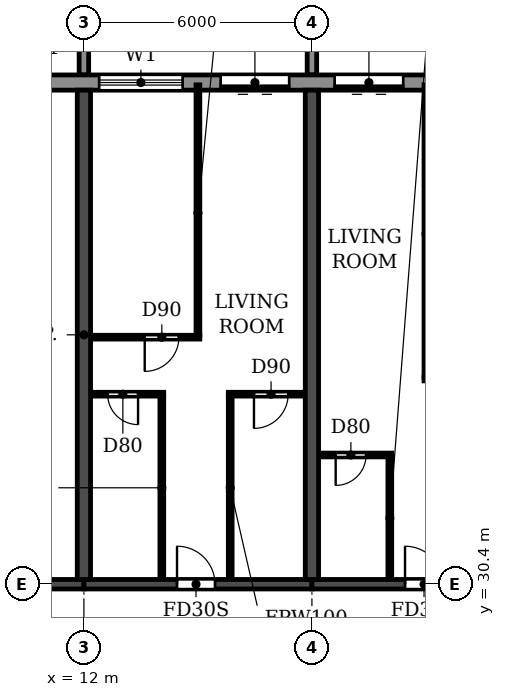
"""IFC4 building model, lengths in metres.
Left out: names, types, materials, properties, quantities, classifications, styles, units other than length and angle.
Written with IfcOpenShell. Run it as: python <this file> out.ifc"""

import sys

from ifc_helpers import new_model, si_unit, direction, frame, frame_2d, origin, place, context, subcontext, project, spatial, polyline, rectangle, outline, extrude, source, transform, mapped, element, fill, save


model = new_model("IFC4")
c1 = context("Model", 3, precision=1e-05, world=origin(), true_north=direction((0.0, 1.0)))
c2 = subcontext(c1, "Body", "Model", "MODEL_VIEW")
j1 = project(units=[si_unit("LENGTHUNIT", "METRE"), si_unit("PLANEANGLEUNIT", "RADIAN")], contexts=[c1])
p1 = place(None, origin())
s1 = spatial("IfcSite", under=j1, at=p1, CompositionType="ELEMENT")
p2 = place(p1, origin())
s2 = spatial("IfcBuilding", under=s1, at=p2, CompositionType="ELEMENT")
p3 = place(p2, frame((0.0, 0.0, 72.9)))
s3 = spatial("IfcBuildingStorey", under=s2, at=p3, CompositionType="ELEMENT", Elevation=72.9)
for number, where, z_axis, x_axis in (
    (1, (12.0, 30.525, 0.0), (0.0, 0.0, 1.0), (0.0, 1.0, 0.0)),
    (2, (18.0, 30.525, 0.0), (0.0, 0.0, 1.0), (0.0, 1.0, 0.0)),
):
    element("IfcWall", number, at=place(p3, frame(where, z_axis=z_axis, x_axis=x_axis)), inside=s3, PredefinedType="SHEAR", context=c2, shape_type="SweptSolid", body=[
        extrude(rectangle(XDim=12.875, YDim=0.35, at=frame_2d((6.438, 0.0))), origin(), (0.0, 0.0, 1.0), 3.06),
    ])
p4 = place(p3, frame((6.2, 30.4, 0.0), z_axis=(0.0, 0.0, 1.0), x_axis=(1.0, 0.0, 0.0)))
e3 = element("IfcWall", 3, at=p4, inside=s3, PredefinedType="SHEAR", context=c2, shape_type="SweptSolid", body=[
    extrude(rectangle(XDim=5.8, YDim=0.25, at=frame_2d((2.9, 0.0))), origin(), (0.0, 0.0, 1.0), 2.46),
])
p5 = place(p4, frame((2.3, 0.0, 0.0)))
e4 = element("IfcOpeningElement", 4, at=p5, cuts=e3, PredefinedType="OPENING", context=c2, shape_type="SweptSolid", body=[
    extrude(rectangle(XDim=1.0, YDim=2.1, at=frame_2d((0.5, 1.05))), frame((0.0, 0.135, 0.0), z_axis=(0.0, -1.0, 0.0), x_axis=(1.0, 0.0, 0.0)), (0.0, 0.0, 1.0), 0.27),
])
p6 = place(p3, frame((12.0, 30.4, 0.0), z_axis=(0.0, 0.0, 1.0), x_axis=(1.0, 0.0, 0.0)))
e5 = element("IfcWall", 5, at=p6, inside=s3, PredefinedType="SHEAR", context=c2, shape_type="SweptSolid", body=[
    extrude(rectangle(XDim=6.0, YDim=0.25, at=frame_2d((3.0, 0.0))), origin(), (0.0, 0.0, 1.0), 2.46),
])
p7 = place(p6, frame((2.45, 0.0, 0.0)))
e6 = element("IfcOpeningElement", 6, at=p7, cuts=e5, PredefinedType="OPENING", context=c2, shape_type="SweptSolid", body=[
    extrude(rectangle(XDim=1.0, YDim=2.1, at=frame_2d((0.5, 1.05))), frame((0.0, 0.135, 0.0), z_axis=(0.0, -1.0, 0.0), x_axis=(1.0, 0.0, 0.0)), (0.0, 0.0, 1.0), 0.27),
])
p8 = place(p3, frame((18.0, 30.4, 0.0), z_axis=(0.0, 0.0, 1.0), x_axis=(1.0, 0.0, 0.0)))
e7 = element("IfcWall", 7, at=p8, inside=s3, PredefinedType="SHEAR", context=c2, shape_type="SweptSolid", body=[
    extrude(rectangle(XDim=6.0, YDim=0.25, at=frame_2d((3.0, 0.0))), origin(), (0.0, 0.0, 1.0), 2.46),
])
p9 = place(p8, frame((2.45, 0.0, 0.0)))
e8 = element("IfcOpeningElement", 8, at=p9, cuts=e7, PredefinedType="OPENING", context=c2, shape_type="SweptSolid", body=[
    extrude(rectangle(XDim=1.0, YDim=2.1, at=frame_2d((0.5, 1.05))), frame((0.0, 0.135, 0.0), z_axis=(0.0, -1.0, 0.0), x_axis=(1.0, 0.0, 0.0)), (0.0, 0.0, 1.0), 0.27),
])
p10 = place(p3, frame((91.317, 43.6, 0.0), z_axis=(0.0, 0.0, 1.0), x_axis=(-1.0, 0.0, 0.0)))
e9 = element("IfcWall", 9, at=p10, inside=s3, PredefinedType="STANDARD", context=c2, shape_type="SweptSolid", body=[
    extrude(rectangle(XDim=80.634, YDim=0.4, at=frame_2d((40.317, 0.0))), origin(), (0.0, 0.0, 1.0), 3.06),
])
p11 = place(p10, frame((76.717, 0.0, 0.9)))
e10 = element("IfcOpeningElement", 10, at=p11, cuts=e9, PredefinedType="OPENING", context=c2, shape_type="SweptSolid", body=[
    extrude(rectangle(XDim=2.2, YDim=1.5, at=frame_2d((1.1, 0.75))), frame((0.0, 0.21, 0.0), z_axis=(0.0, -1.0, 0.0), x_axis=(1.0, 0.0, 0.0)), (0.0, 0.0, 1.0), 0.42),
])
p12 = place(p10, frame((73.917, 0.0, 0.0)))
e11 = element("IfcOpeningElement", 11, at=p12, cuts=e9, PredefinedType="OPENING", context=c2, shape_type="SweptSolid", body=[
    extrude(rectangle(XDim=1.8, YDim=2.4, at=frame_2d((0.9, 1.2))), frame((0.0, 0.21, 0.0), z_axis=(0.0, -1.0, 0.0), x_axis=(1.0, 0.0, 0.0)), (0.0, 0.0, 1.0), 0.42),
])
p13 = place(p10, frame((70.917, 0.0, 0.0)))
e12 = element("IfcOpeningElement", 12, at=p13, cuts=e9, PredefinedType="OPENING", context=c2, shape_type="SweptSolid", body=[
    extrude(rectangle(XDim=1.8, YDim=2.4, at=frame_2d((0.9, 1.2))), frame((0.0, 0.21, 0.0), z_axis=(0.0, -1.0, 0.0), x_axis=(1.0, 0.0, 0.0)), (0.0, 0.0, 1.0), 0.42),
])
p14 = place(p10, frame((67.717, 0.0, 0.9)))
e13 = element("IfcOpeningElement", 13, at=p14, cuts=e9, PredefinedType="OPENING", context=c2, shape_type="SweptSolid", body=[
    extrude(rectangle(XDim=2.2, YDim=1.5, at=frame_2d((1.1, 0.75))), frame((0.0, 0.21, 0.0), z_axis=(0.0, -1.0, 0.0), x_axis=(1.0, 0.0, 0.0)), (0.0, 0.0, 1.0), 0.42),
])
p15 = place(p10, frame((64.717, 0.0, 0.9)))
e14 = element("IfcOpeningElement", 14, at=p15, cuts=e9, PredefinedType="OPENING", context=c2, shape_type="SweptSolid", body=[
    extrude(rectangle(XDim=2.2, YDim=1.5, at=frame_2d((1.1, 0.75))), frame((0.0, 0.21, 0.0), z_axis=(0.0, -1.0, 0.0), x_axis=(1.0, 0.0, 0.0)), (0.0, 0.0, 1.0), 0.42),
])
p16 = place(p10, frame((61.917, 0.0, 0.0)))
e15 = element("IfcOpeningElement", 15, at=p16, cuts=e9, PredefinedType="OPENING", context=c2, shape_type="SweptSolid", body=[
    extrude(rectangle(XDim=1.8, YDim=2.4, at=frame_2d((0.9, 1.2))), frame((0.0, 0.21, 0.0), z_axis=(0.0, -1.0, 0.0), x_axis=(1.0, 0.0, 0.0)), (0.0, 0.0, 1.0), 0.42),
])
p17 = place(p10, frame((58.717, 0.0, 0.9)))
e16 = element("IfcOpeningElement", 16, at=p17, cuts=e9, PredefinedType="OPENING", context=c2, shape_type="SweptSolid", body=[
    extrude(rectangle(XDim=2.2, YDim=1.5, at=frame_2d((1.1, 0.75))), frame((0.0, 0.21, 0.0), z_axis=(0.0, -1.0, 0.0), x_axis=(1.0, 0.0, 0.0)), (0.0, 0.0, 1.0), 0.42),
])
p18 = place(p10, frame((55.917, 0.0, 0.0)))
e17 = element("IfcOpeningElement", 17, at=p18, cuts=e9, PredefinedType="OPENING", context=c2, shape_type="SweptSolid", body=[
    extrude(rectangle(XDim=1.8, YDim=2.4, at=frame_2d((0.9, 1.2))), frame((0.0, 0.21, 0.0), z_axis=(0.0, -1.0, 0.0), x_axis=(1.0, 0.0, 0.0)), (0.0, 0.0, 1.0), 0.42),
])
p19 = place(p10, frame((52.717, 0.0, 0.9)))
e18 = element("IfcOpeningElement", 18, at=p19, cuts=e9, PredefinedType="OPENING", context=c2, shape_type="SweptSolid", body=[
    extrude(rectangle(XDim=2.2, YDim=1.5, at=frame_2d((1.1, 0.75))), frame((0.0, 0.21, 0.0), z_axis=(0.0, -1.0, 0.0), x_axis=(1.0, 0.0, 0.0)), (0.0, 0.0, 1.0), 0.42),
])
p20 = place(p10, frame((49.717, 0.0, 0.9)))
e19 = element("IfcOpeningElement", 19, at=p20, cuts=e9, PredefinedType="OPENING", context=c2, shape_type="SweptSolid", body=[
    extrude(rectangle(XDim=2.2, YDim=1.5, at=frame_2d((1.1, 0.75))), frame((0.0, 0.21, 0.0), z_axis=(0.0, -1.0, 0.0), x_axis=(1.0, 0.0, 0.0)), (0.0, 0.0, 1.0), 0.42),
])
p21 = place(p10, frame((46.917, 0.0, 0.0)))
e20 = element("IfcOpeningElement", 20, at=p21, cuts=e9, PredefinedType="OPENING", context=c2, shape_type="SweptSolid", body=[
    extrude(rectangle(XDim=1.8, YDim=2.4, at=frame_2d((0.9, 1.2))), frame((0.0, 0.21, 0.0), z_axis=(0.0, -1.0, 0.0), x_axis=(1.0, 0.0, 0.0)), (0.0, 0.0, 1.0), 0.42),
])
p22 = place(p10, frame((43.717, 0.0, 0.9)))
e21 = element("IfcOpeningElement", 21, at=p22, cuts=e9, PredefinedType="OPENING", context=c2, shape_type="SweptSolid", body=[
    extrude(rectangle(XDim=2.2, YDim=1.5, at=frame_2d((1.1, 0.75))), frame((0.0, 0.21, 0.0), z_axis=(0.0, -1.0, 0.0), x_axis=(1.0, 0.0, 0.0)), (0.0, 0.0, 1.0), 0.42),
])
p23 = place(p10, frame((40.717, 0.0, 0.9)))
e22 = element("IfcOpeningElement", 22, at=p23, cuts=e9, PredefinedType="OPENING", context=c2, shape_type="SweptSolid", body=[
    extrude(rectangle(XDim=2.2, YDim=1.5, at=frame_2d((1.1, 0.75))), frame((0.0, 0.21, 0.0), z_axis=(0.0, -1.0, 0.0), x_axis=(1.0, 0.0, 0.0)), (0.0, 0.0, 1.0), 0.42),
])
p24 = place(p10, frame((37.917, 0.0, 0.0)))
e23 = element("IfcOpeningElement", 23, at=p24, cuts=e9, PredefinedType="OPENING", context=c2, shape_type="SweptSolid", body=[
    extrude(rectangle(XDim=1.8, YDim=2.4, at=frame_2d((0.9, 1.2))), frame((0.0, 0.21, 0.0), z_axis=(0.0, -1.0, 0.0), x_axis=(1.0, 0.0, 0.0)), (0.0, 0.0, 1.0), 0.42),
])
p25 = place(p10, frame((34.717, 0.0, 0.9)))
e24 = element("IfcOpeningElement", 24, at=p25, cuts=e9, PredefinedType="OPENING", context=c2, shape_type="SweptSolid", body=[
    extrude(rectangle(XDim=2.2, YDim=1.5, at=frame_2d((1.1, 0.75))), frame((0.0, 0.21, 0.0), z_axis=(0.0, -1.0, 0.0), x_axis=(1.0, 0.0, 0.0)), (0.0, 0.0, 1.0), 0.42),
])
p26 = place(p10, frame((31.917, 0.0, 0.0)))
e25 = element("IfcOpeningElement", 25, at=p26, cuts=e9, PredefinedType="OPENING", context=c2, shape_type="SweptSolid", body=[
    extrude(rectangle(XDim=1.8, YDim=2.4, at=frame_2d((0.9, 1.2))), frame((0.0, 0.21, 0.0), z_axis=(0.0, -1.0, 0.0), x_axis=(1.0, 0.0, 0.0)), (0.0, 0.0, 1.0), 0.42),
])
p27 = place(p10, frame((28.717, 0.0, 0.9)))
e26 = element("IfcOpeningElement", 26, at=p27, cuts=e9, PredefinedType="OPENING", context=c2, shape_type="SweptSolid", body=[
    extrude(rectangle(XDim=2.2, YDim=1.5, at=frame_2d((1.1, 0.75))), frame((0.0, 0.21, 0.0), z_axis=(0.0, -1.0, 0.0), x_axis=(1.0, 0.0, 0.0)), (0.0, 0.0, 1.0), 0.42),
])
p28 = place(p10, frame((25.717, 0.0, 0.9)))
e27 = element("IfcOpeningElement", 27, at=p28, cuts=e9, PredefinedType="OPENING", context=c2, shape_type="SweptSolid", body=[
    extrude(rectangle(XDim=2.2, YDim=1.5, at=frame_2d((1.1, 0.75))), frame((0.0, 0.21, 0.0), z_axis=(0.0, -1.0, 0.0), x_axis=(1.0, 0.0, 0.0)), (0.0, 0.0, 1.0), 0.42),
])
p29 = place(p10, frame((22.717, 0.0, 0.9)))
e28 = element("IfcOpeningElement", 28, at=p29, cuts=e9, PredefinedType="OPENING", context=c2, shape_type="SweptSolid", body=[
    extrude(rectangle(XDim=2.2, YDim=1.5, at=frame_2d((1.1, 0.75))), frame((0.0, 0.21, 0.0), z_axis=(0.0, -1.0, 0.0), x_axis=(1.0, 0.0, 0.0)), (0.0, 0.0, 1.0), 0.42),
])
p30 = place(p10, frame((19.917, 0.0, 0.0)))
e29 = element("IfcOpeningElement", 29, at=p30, cuts=e9, PredefinedType="OPENING", context=c2, shape_type="SweptSolid", body=[
    extrude(rectangle(XDim=1.8, YDim=2.4, at=frame_2d((0.9, 1.2))), frame((0.0, 0.21, 0.0), z_axis=(0.0, -1.0, 0.0), x_axis=(1.0, 0.0, 0.0)), (0.0, 0.0, 1.0), 0.42),
])
p31 = place(p10, frame((16.717, 0.0, 0.9)))
e30 = element("IfcOpeningElement", 30, at=p31, cuts=e9, PredefinedType="OPENING", context=c2, shape_type="SweptSolid", body=[
    extrude(rectangle(XDim=2.2, YDim=1.5, at=frame_2d((1.1, 0.75))), frame((0.0, 0.21, 0.0), z_axis=(0.0, -1.0, 0.0), x_axis=(1.0, 0.0, 0.0)), (0.0, 0.0, 1.0), 0.42),
])
p32 = place(p10, frame((13.717, 0.0, 0.9)))
e31 = element("IfcOpeningElement", 31, at=p32, cuts=e9, PredefinedType="OPENING", context=c2, shape_type="SweptSolid", body=[
    extrude(rectangle(XDim=2.2, YDim=1.5, at=frame_2d((1.1, 0.75))), frame((0.0, 0.21, 0.0), z_axis=(0.0, -1.0, 0.0), x_axis=(1.0, 0.0, 0.0)), (0.0, 0.0, 1.0), 0.42),
])
p33 = place(p10, frame((10.717, 0.0, 0.9)))
e32 = element("IfcOpeningElement", 32, at=p33, cuts=e9, PredefinedType="OPENING", context=c2, shape_type="SweptSolid", body=[
    extrude(rectangle(XDim=2.2, YDim=1.5, at=frame_2d((1.1, 0.75))), frame((0.0, 0.21, 0.0), z_axis=(0.0, -1.0, 0.0), x_axis=(1.0, 0.0, 0.0)), (0.0, 0.0, 1.0), 0.42),
])
p34 = place(p10, frame((7.917, 0.0, 0.0)))
e33 = element("IfcOpeningElement", 33, at=p34, cuts=e9, PredefinedType="OPENING", context=c2, shape_type="SweptSolid", body=[
    extrude(rectangle(XDim=1.8, YDim=2.4, at=frame_2d((0.9, 1.2))), frame((0.0, 0.21, 0.0), z_axis=(0.0, -1.0, 0.0), x_axis=(1.0, 0.0, 0.0)), (0.0, 0.0, 1.0), 0.42),
])
p35 = place(p10, frame((4.717, 0.0, 0.9)))
e34 = element("IfcOpeningElement", 34, at=p35, cuts=e9, PredefinedType="OPENING", context=c2, shape_type="SweptSolid", body=[
    extrude(rectangle(XDim=2.2, YDim=1.5, at=frame_2d((1.1, 0.75))), frame((0.0, 0.21, 0.0), z_axis=(0.0, -1.0, 0.0), x_axis=(1.0, 0.0, 0.0)), (0.0, 0.0, 1.0), 0.42),
])
p36 = place(p10, frame((1.917, 0.0, 0.0)))
e35 = element("IfcOpeningElement", 35, at=p36, cuts=e9, PredefinedType="OPENING", context=c2, shape_type="SweptSolid", body=[
    extrude(rectangle(XDim=1.8, YDim=2.4, at=frame_2d((0.9, 1.2))), frame((0.0, 0.21, 0.0), z_axis=(0.0, -1.0, 0.0), x_axis=(1.0, 0.0, 0.0)), (0.0, 0.0, 1.0), 0.42),
])
m1 = source(origin(), c2, "Body", "SweptSolid", [
    extrude(outline(polyline([(0.0, 0.0), (0.25, 0.0), (0.25, 3.1), (0.0, 3.1), (0.0, 0.0)])), origin(), (0.0, 0.0, 1.0), 3.1),
])
for number, where in (
    (36, (11.875, 43.8, 0.0)),
    (37, (17.875, 43.8, 0.0)),
):
    element("IfcWall", number, at=place(p3, frame(where)), inside=s3, PredefinedType="STANDARD", context=c2, shape_type="MappedRepresentation", body=[
        mapped(m1, transform((0.0, 0.0, 0.0))),
    ])
p37 = place(p3, frame((18.185, 33.8, 0.0), z_axis=(0.0, 0.0, 1.0), x_axis=(1.0, 0.0, 0.0)))
e38 = element("IfcWall", 38, at=p37, inside=s3, PredefinedType="PARTITIONING", context=c2, shape_type="SweptSolid", body=[
    extrude(rectangle(XDim=1.915, YDim=0.1, at=frame_2d((0.958, 0.0))), origin(), (0.0, 0.0, 1.0), 3.06),
])
p38 = place(p37, frame((0.44, 0.0, 0.0)))
e39 = element("IfcOpeningElement", 39, at=p38, cuts=e38, PredefinedType="OPENING", context=c2, shape_type="SweptSolid", body=[
    extrude(rectangle(XDim=0.8, YDim=2.1, at=frame_2d((0.4, 1.05))), frame((0.0, 0.06, 0.0), z_axis=(0.0, -1.0, 0.0), x_axis=(1.0, 0.0, 0.0)), (0.0, 0.0, 1.0), 0.12),
])
p39 = place(p3, frame((12.185, 35.4, 0.0), z_axis=(0.0, 0.0, 1.0), x_axis=(1.0, 0.0, 0.0)))
e40 = element("IfcWall", 40, at=p39, inside=s3, PredefinedType="PARTITIONING", context=c2, shape_type="SweptSolid", body=[
    extrude(rectangle(XDim=1.915, YDim=0.1, at=frame_2d((0.958, 0.0))), origin(), (0.0, 0.0, 1.0), 3.06),
])
p40 = place(p39, frame((0.44, 0.0, 0.0)))
e41 = element("IfcOpeningElement", 41, at=p40, cuts=e40, PredefinedType="OPENING", context=c2, shape_type="SweptSolid", body=[
    extrude(rectangle(XDim=0.8, YDim=2.1, at=frame_2d((0.4, 1.05))), frame((0.0, 0.06, 0.0), z_axis=(0.0, -1.0, 0.0), x_axis=(1.0, 0.0, 0.0)), (0.0, 0.0, 1.0), 0.12),
])
p41 = place(p3, frame((15.8, 35.4, 0.0), z_axis=(0.0, 0.0, 1.0), x_axis=(1.0, 0.0, 0.0)))
e42 = element("IfcWall", 42, at=p41, inside=s3, PredefinedType="PARTITIONING", context=c2, shape_type="SweptSolid", body=[
    extrude(rectangle(XDim=2.015, YDim=0.1, at=frame_2d((1.007, 0.0))), origin(), (0.0, 0.0, 1.0), 3.06),
])
p42 = place(p41, frame((0.675, 0.0, 0.0)))
e43 = element("IfcOpeningElement", 43, at=p42, cuts=e42, PredefinedType="OPENING", context=c2, shape_type="SweptSolid", body=[
    extrude(rectangle(XDim=0.9, YDim=2.1, at=frame_2d((0.45, 1.05))), frame((0.0, 0.06, 0.0), z_axis=(0.0, -1.0, 0.0), x_axis=(1.0, 0.0, 0.0)), (0.0, 0.0, 1.0), 0.12),
])
p43 = place(p3, frame((20.95, 35.8, 0.0), z_axis=(0.0, 0.0, 1.0), x_axis=(1.0, 0.0, 0.0)))
e44 = element("IfcWall", 44, at=p43, inside=s3, PredefinedType="PARTITIONING", context=c2, shape_type="SweptSolid", body=[
    extrude(rectangle(XDim=2.865, YDim=0.1, at=frame_2d((1.433, 0.0))), origin(), (0.0, 0.0, 1.0), 3.06),
])
p44 = place(p43, frame((1.65, 0.0, 0.0)))
e45 = element("IfcOpeningElement", 45, at=p44, cuts=e44, PredefinedType="OPENING", context=c2, shape_type="SweptSolid", body=[
    extrude(rectangle(XDim=0.9, YDim=2.1, at=frame_2d((0.45, 1.05))), frame((0.0, 0.06, 0.0), z_axis=(0.0, -1.0, 0.0), x_axis=(1.0, 0.0, 0.0)), (0.0, 0.0, 1.0), 0.12),
])
p45 = place(p3, frame((12.185, 36.9, 0.0), z_axis=(0.0, 0.0, 1.0), x_axis=(1.0, 0.0, 0.0)))
e46 = element("IfcWall", 46, at=p45, inside=s3, PredefinedType="PARTITIONING", context=c2, shape_type="SweptSolid", body=[
    extrude(rectangle(XDim=2.865, YDim=0.1, at=frame_2d((1.433, 0.0))), origin(), (0.0, 0.0, 1.0), 3.06),
])
p46 = place(p45, frame((1.415, 0.0, 0.0)))
e47 = element("IfcOpeningElement", 47, at=p46, cuts=e46, PredefinedType="OPENING", context=c2, shape_type="SweptSolid", body=[
    extrude(rectangle(XDim=0.9, YDim=2.1, at=frame_2d((0.45, 1.05))), frame((0.0, 0.06, 0.0), z_axis=(0.0, -1.0, 0.0), x_axis=(1.0, 0.0, 0.0)), (0.0, 0.0, 1.0), 0.12),
])
p47 = place(p3, frame((14.05, 30.535, 0.0), z_axis=(0.0, 0.0, 1.0), x_axis=(0.0, 1.0, 0.0)))
e48 = element("IfcWall", 48, at=p47, inside=s3, PredefinedType="PARTITIONING", context=c2, shape_type="SweptSolid", body=[
    extrude(rectangle(XDim=4.815, YDim=0.1, at=frame_2d((2.408, 0.0))), origin(), (0.0, 0.0, 1.0), 3.06),
])
p48 = place(p3, frame((15.0, 36.95, 0.0), z_axis=(0.0, 0.0, 1.0), x_axis=(0.0, 1.0, 0.0)))
e49 = element("IfcWall", 49, at=p48, inside=s3, PredefinedType="PARTITIONING", context=c2, shape_type="SweptSolid", body=[
    extrude(rectangle(XDim=6.59, YDim=0.1, at=frame_2d((3.295, 0.0))), origin(), (0.0, 0.0, 1.0), 3.06),
])
p49 = place(p3, frame((15.85, 30.535, 0.0), z_axis=(0.0, 0.0, 1.0), x_axis=(0.0, 1.0, 0.0)))
e50 = element("IfcWall", 50, at=p49, inside=s3, PredefinedType="PARTITIONING", context=c2, shape_type="SweptSolid", body=[
    extrude(rectangle(XDim=4.815, YDim=0.1, at=frame_2d((2.408, 0.0))), origin(), (0.0, 0.0, 1.0), 3.06),
])
p50 = place(p3, frame((20.05, 30.535, 0.0), z_axis=(0.0, 0.0, 1.0), x_axis=(0.0, 1.0, 0.0)))
e51 = element("IfcWall", 51, at=p50, inside=s3, PredefinedType="PARTITIONING", context=c2, shape_type="SweptSolid", body=[
    extrude(rectangle(XDim=3.215, YDim=0.1, at=frame_2d((1.607, 0.0))), origin(), (0.0, 0.0, 1.0), 3.06),
])
p51 = place(p3, frame((21.0, 35.85, 0.0), z_axis=(0.0, 0.0, 1.0), x_axis=(0.0, 1.0, 0.0)))
e52 = element("IfcWall", 52, at=p51, inside=s3, PredefinedType="PARTITIONING", context=c2, shape_type="SweptSolid", body=[
    extrude(rectangle(XDim=7.69, YDim=0.1, at=frame_2d((3.845, 0.0))), origin(), (0.0, 0.0, 1.0), 3.06),
])
p52 = place(p11, origin())
e53 = element("IfcWindow", 53, at=p52, inside=s3, PartitioningType="DOUBLE_PANEL_HORIZONTAL", PredefinedType="WINDOW", context=c2, shape_type="SweptSolid", body=[
    extrude(rectangle(XDim=2.2, YDim=1.5, at=frame_2d((1.1, 0.75))), frame((0.0, 0.03, 0.0), z_axis=(0.0, -1.0, 0.0), x_axis=(1.0, 0.0, 0.0)), (0.0, 0.0, 1.0), 0.06),
])
fill(e10, e53)
p53 = place(p12, origin())
e54 = element("IfcDoor", 54, at=p53, inside=s3, OperationType="DOUBLE_DOOR_SLIDING", PredefinedType="DOOR", context=c2, shape_type="SweptSolid", body=[
    extrude(rectangle(XDim=1.8, YDim=2.4, at=frame_2d((0.9, 1.2))), frame((0.0, 0.025, 0.0), z_axis=(0.0, -1.0, 0.0), x_axis=(1.0, 0.0, 0.0)), (0.0, 0.0, 1.0), 0.05),
])
fill(e11, e54)
p54 = place(p13, origin())
e55 = element("IfcDoor", 55, at=p54, inside=s3, OperationType="DOUBLE_DOOR_SLIDING", PredefinedType="DOOR", context=c2, shape_type="SweptSolid", body=[
    extrude(rectangle(XDim=1.8, YDim=2.4, at=frame_2d((0.9, 1.2))), frame((0.0, 0.025, 0.0), z_axis=(0.0, -1.0, 0.0), x_axis=(1.0, 0.0, 0.0)), (0.0, 0.0, 1.0), 0.05),
])
fill(e12, e55)
p55 = place(p40, frame((0.8, 0.0, 0.0), z_axis=(0.0, 0.0, 1.0), x_axis=(-1.0, 0.0, 0.0)))
e56 = element("IfcDoor", 56, at=p55, inside=s3, OperationType="SINGLE_SWING_LEFT", PredefinedType="DOOR", context=c2, shape_type="SweptSolid", body=[
    extrude(rectangle(XDim=0.8, YDim=2.1, at=frame_2d((0.4, 1.05))), frame((0.0, 0.025, 0.0), z_axis=(0.0, -1.0, 0.0), x_axis=(1.0, 0.0, 0.0)), (0.0, 0.0, 1.0), 0.05),
])
fill(e41, e56)
p56 = place(p46, frame((0.9, 0.0, 0.0), z_axis=(0.0, 0.0, 1.0), x_axis=(-1.0, 0.0, 0.0)))
e57 = element("IfcDoor", 57, at=p56, inside=s3, OperationType="SINGLE_SWING_RIGHT", PredefinedType="DOOR", context=c2, shape_type="SweptSolid", body=[
    extrude(rectangle(XDim=0.9, YDim=2.1, at=frame_2d((0.45, 1.05))), frame((0.0, 0.025, 0.0), z_axis=(0.0, -1.0, 0.0), x_axis=(1.0, 0.0, 0.0)), (0.0, 0.0, 1.0), 0.05),
])
fill(e47, e57)
p57 = place(p7, origin())
e58 = element("IfcDoor", 58, at=p57, inside=s3, OperationType="SINGLE_SWING_LEFT", PredefinedType="DOOR", context=c2, shape_type="SweptSolid", body=[
    extrude(rectangle(XDim=1.0, YDim=2.1, at=frame_2d((0.5, 1.05))), frame((0.0, 0.025, 0.0), z_axis=(0.0, -1.0, 0.0), x_axis=(1.0, 0.0, 0.0)), (0.0, 0.0, 1.0), 0.05),
])
fill(e6, e58)
p58 = place(p42, frame((0.9, 0.0, 0.0), z_axis=(0.0, 0.0, 1.0), x_axis=(-1.0, 0.0, 0.0)))
e59 = element("IfcDoor", 59, at=p58, inside=s3, OperationType="SINGLE_SWING_RIGHT", PredefinedType="DOOR", context=c2, shape_type="SweptSolid", body=[
    extrude(rectangle(XDim=0.9, YDim=2.1, at=frame_2d((0.45, 1.05))), frame((0.0, 0.025, 0.0), z_axis=(0.0, -1.0, 0.0), x_axis=(1.0, 0.0, 0.0)), (0.0, 0.0, 1.0), 0.05),
])
fill(e43, e59)
p59 = place(p38, frame((0.8, 0.0, 0.0), z_axis=(0.0, 0.0, 1.0), x_axis=(-1.0, 0.0, 0.0)))
e60 = element("IfcDoor", 60, at=p59, inside=s3, OperationType="SINGLE_SWING_RIGHT", PredefinedType="DOOR", context=c2, shape_type="SweptSolid", body=[
    extrude(rectangle(XDim=0.8, YDim=2.1, at=frame_2d((0.4, 1.05))), frame((0.0, 0.025, 0.0), z_axis=(0.0, -1.0, 0.0), x_axis=(1.0, 0.0, 0.0)), (0.0, 0.0, 1.0), 0.05),
])
fill(e39, e60)
p60 = place(p9, origin())
e61 = element("IfcDoor", 61, at=p60, inside=s3, OperationType="SINGLE_SWING_LEFT", PredefinedType="DOOR", context=c2, shape_type="SweptSolid", body=[
    extrude(rectangle(XDim=1.0, YDim=2.1, at=frame_2d((0.5, 1.05))), frame((0.0, 0.025, 0.0), z_axis=(0.0, -1.0, 0.0), x_axis=(1.0, 0.0, 0.0)), (0.0, 0.0, 1.0), 0.05),
])
fill(e8, e61)
save(model, sys.argv[1])
